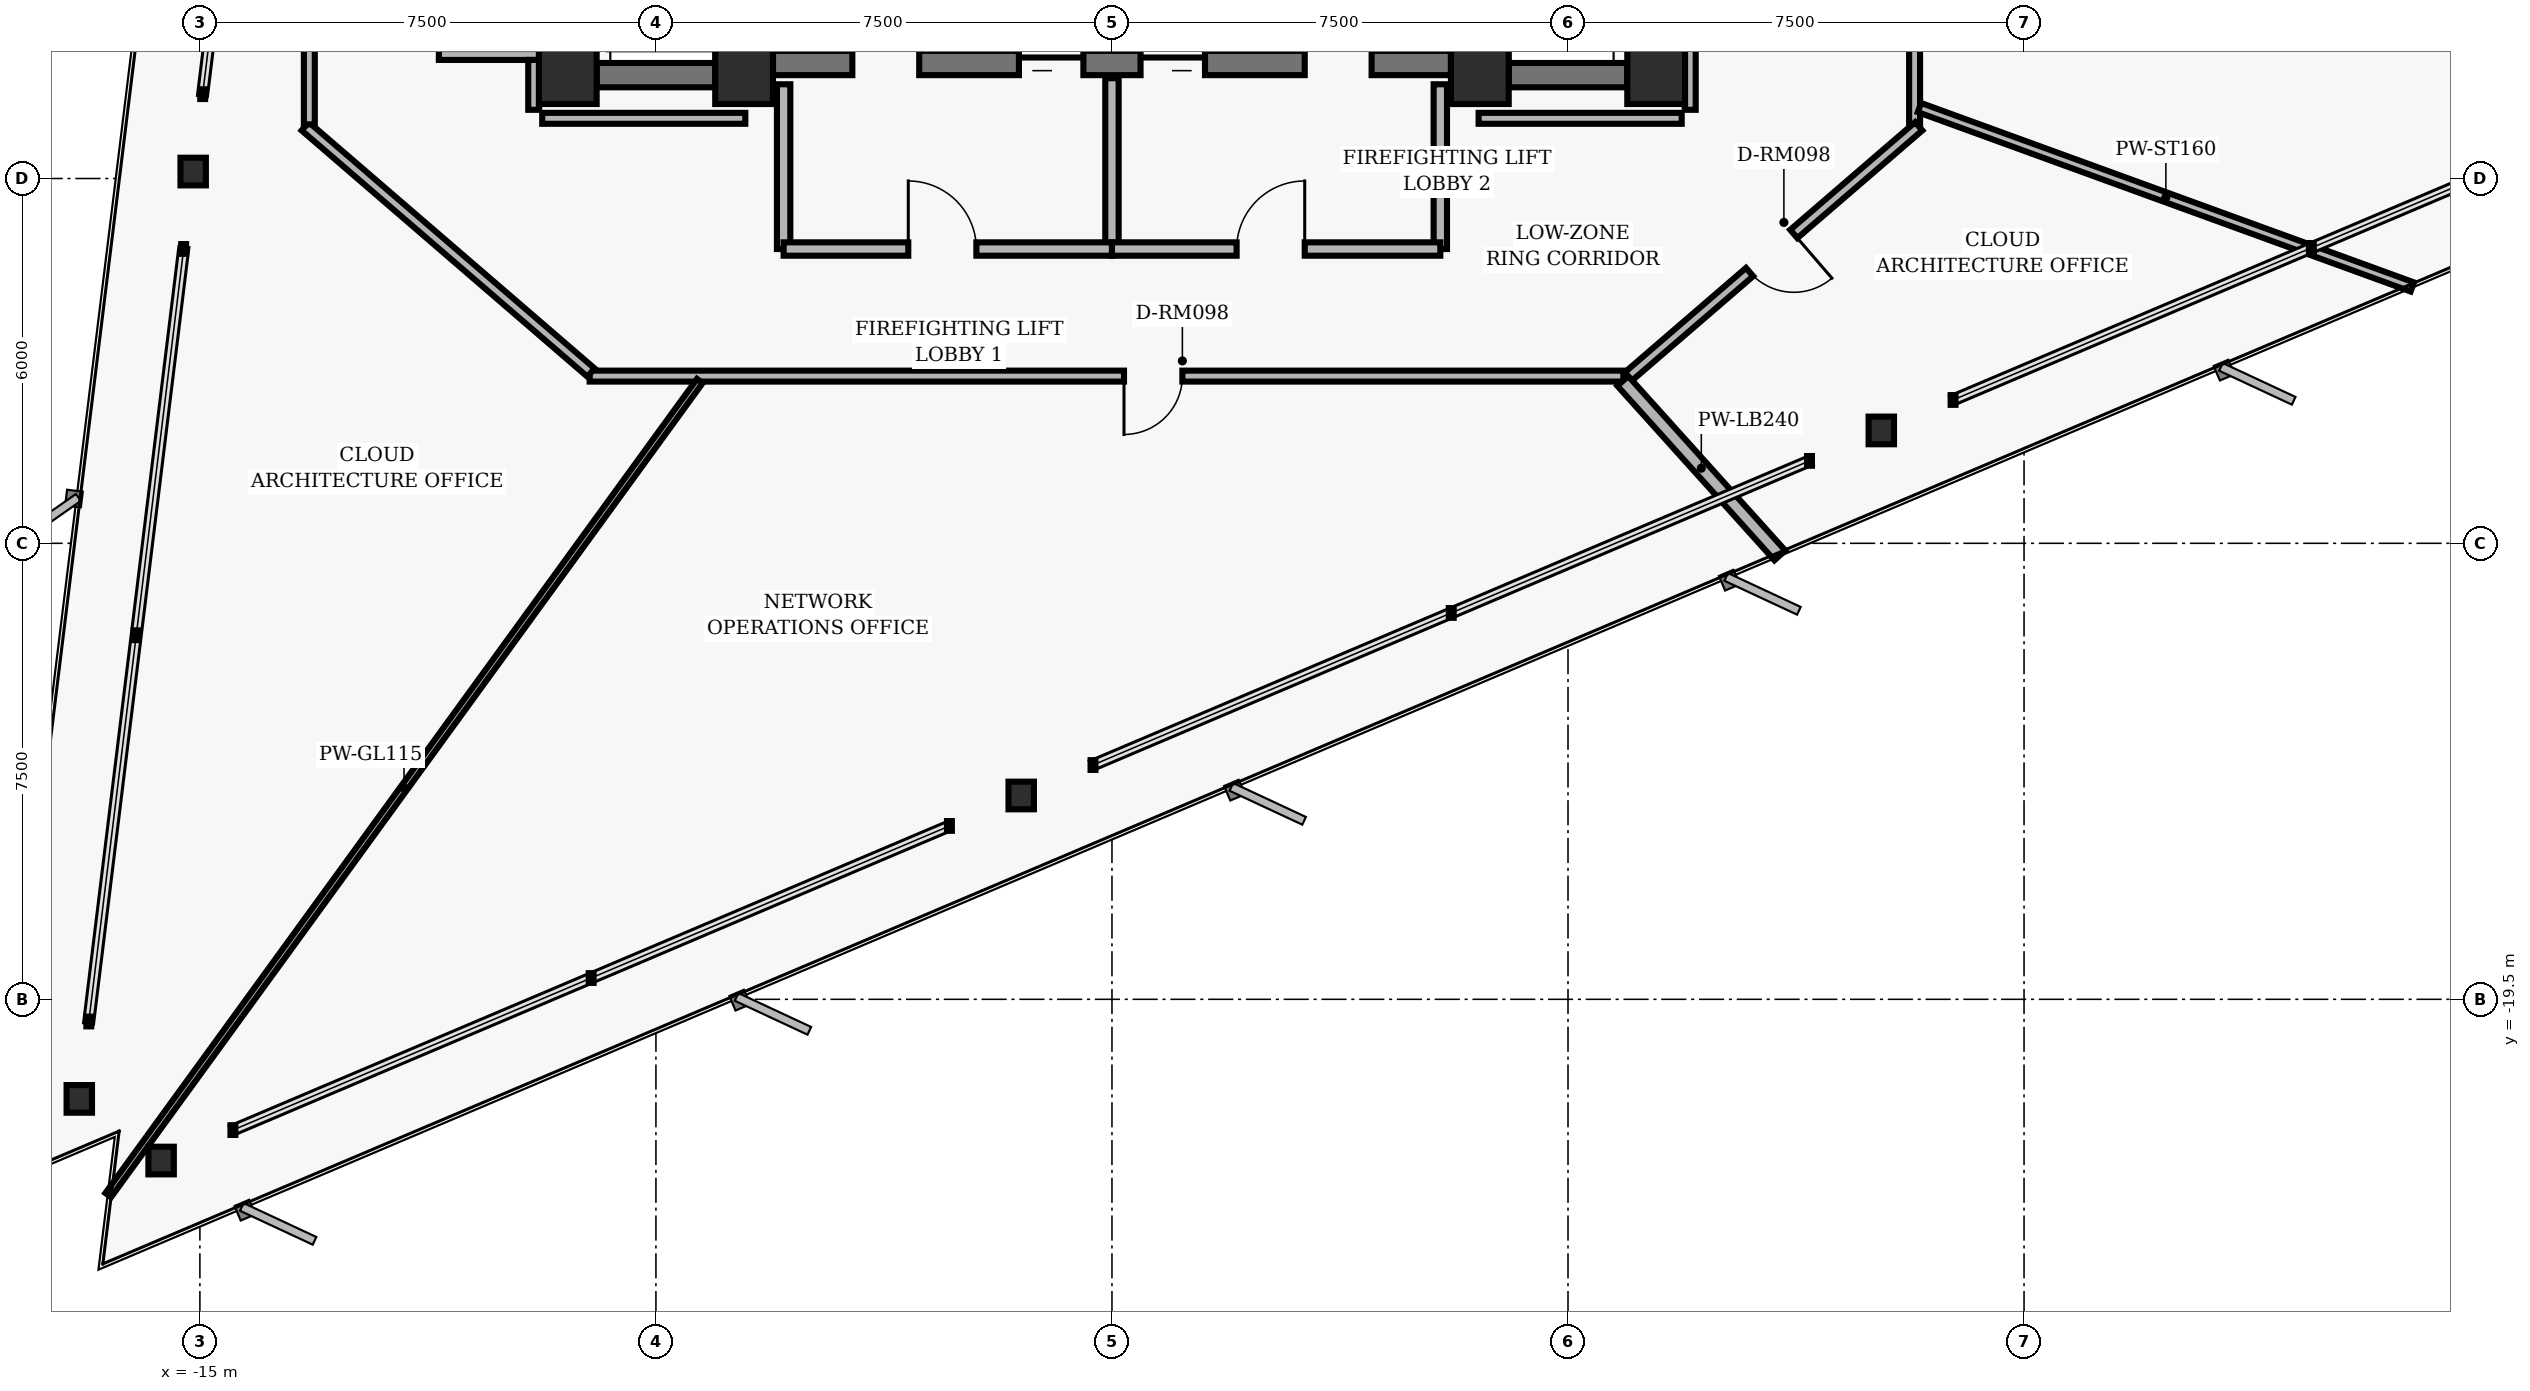
"""IFC4 building model, lengths in metres.
Left out: names, types, materials, properties, quantities, classifications, styles, units other than length and angle.
Written with IfcOpenShell. Run it as: python <this file> out.ifc"""

import sys

from ifc_helpers import new_model, si_unit, direction, frame, frame_2d, origin, origin_2d, place, context, subcontext, project, spatial, rectangle, hollow_rectangle, i_section, extrude, element, fill, save


model = new_model("IFC4")
c1 = context("Model", 3, precision=1e-05, world=origin(), true_north=direction((0.0, 1.0)))
c2 = subcontext(c1, "Body", "Model", "MODEL_VIEW")
j1 = project(units=[si_unit("LENGTHUNIT", "METRE"), si_unit("PLANEANGLEUNIT", "RADIAN")], contexts=[c1])
p1 = place(None, origin())
s1 = spatial("IfcSite", under=j1, at=p1, CompositionType="ELEMENT")
p2 = place(p1, origin())
s2 = spatial("IfcBuilding", under=s1, at=p2, CompositionType="ELEMENT")
p3 = place(p2, frame((0.0, 0.0, 73.12)))
s3 = spatial("IfcBuildingStorey", under=s2, at=p3, CompositionType="ELEMENT", Elevation=73.12)
for number, where, z_axis, x_axis in (
    (1, (-6.05, -4.3, 0.0), (0.0, 0.0, 1.0), (1.0, 0.0, 0.0)),
    (2, (6.05, -4.3, 0.0), (0.0, 0.0, 1.0), (1.0, 0.0, 0.0)),
    (3, (-8.95, -4.3, 0.0), (0.0, 0.0, 1.0), (1.0, 0.0, 0.0)),
    (4, (8.95, -4.3, 0.0), (0.0, 0.0, 1.0), (1.0, 0.0, 0.0)),
):
    element("IfcColumn", number, at=place(p3, frame(where, z_axis=z_axis, x_axis=x_axis)), inside=s3, PredefinedType="COLUMN", context=c2, shape_type="SweptSolid", body=[
        extrude(hollow_rectangle(XDim=0.95, YDim=0.95, WallThickness=0.06, InnerFilletRadius=0.02, OuterFilletRadius=0.04, at=origin_2d()), origin(), (0.0, 0.0, 1.0), 3.36),
    ])
for number, where, z_axis, x_axis in (
    (5, (-1.94, -4.1, 0.0), (0.0, 0.0, 1.0), (0.0, 1.0, 0.0)),
    (6, (1.94, -4.1, 0.0), (0.0, 0.0, 1.0), (0.0, 1.0, 0.0)),
):
    element("IfcWall", number, at=place(p3, frame(where, z_axis=z_axis, x_axis=x_axis)), inside=s3, PredefinedType="SHEAR", context=c2, shape_type="SweptSolid", body=[
        extrude(rectangle(XDim=8.2, YDim=0.35, at=frame_2d((4.1, 0.0))), origin(), (0.0, 0.0, 1.0), 2.938),
    ])
p4 = place(p3, frame((-5.575, -4.1, 0.0), z_axis=(0.0, 0.0, 1.0), x_axis=(1.0, 0.0, 0.0)))
e7 = element("IfcWall", 7, at=p4, inside=s3, PredefinedType="SHEAR", context=c2, shape_type="SweptSolid", body=[
    extrude(rectangle(XDim=11.15, YDim=0.4, at=frame_2d((5.575, 0.0))), origin(), (0.0, 0.0, 1.0), 2.938),
])
p5 = place(p4, frame((1.305, 0.0, 0.0)))
e8 = element("IfcOpeningElement", 8, at=p5, cuts=e7, PredefinedType="OPENING", context=c2, shape_type="SweptSolid", body=[
    extrude(rectangle(XDim=1.1, YDim=2.04, at=frame_2d((0.55, 1.02))), frame((0.0, 0.21, 0.0), z_axis=(0.0, -1.0, 0.0), x_axis=(1.0, 0.0, 0.0)), (0.0, 0.0, 1.0), 0.42),
])
p6 = place(p4, frame((8.745, 0.0, 0.0)))
e9 = element("IfcOpeningElement", 9, at=p6, cuts=e7, PredefinedType="OPENING", context=c2, shape_type="SweptSolid", body=[
    extrude(rectangle(XDim=1.1, YDim=2.04, at=frame_2d((0.55, 1.02))), frame((0.0, 0.21, 0.0), z_axis=(0.0, -1.0, 0.0), x_axis=(1.0, 0.0, 0.0)), (0.0, 0.0, 1.0), 0.42),
])
p7 = place(p4, frame((4.045, 0.0, 0.0)))
e10 = element("IfcOpeningElement", 10, at=p7, cuts=e7, PredefinedType="OPENING", context=c2, shape_type="SweptSolid", body=[
    extrude(rectangle(XDim=1.06, YDim=2.04, at=frame_2d((0.53, 1.02))), frame((0.0, 0.21, 0.0), z_axis=(0.0, -1.0, 0.0), x_axis=(1.0, 0.0, 0.0)), (0.0, 0.0, 1.0), 0.42),
])
p8 = place(p4, frame((6.045, 0.0, 0.0)))
e11 = element("IfcOpeningElement", 11, at=p8, cuts=e7, PredefinedType="OPENING", context=c2, shape_type="SweptSolid", body=[
    extrude(rectangle(XDim=1.06, YDim=2.04, at=frame_2d((0.53, 1.02))), frame((0.0, 0.21, 0.0), z_axis=(0.0, -1.0, 0.0), x_axis=(1.0, 0.0, 0.0)), (0.0, 0.0, 1.0), 0.42),
])
for number, where, z_axis, x_axis in (
    (12, (-8.475, -4.3, 0.0), (0.0, 0.0, 1.0), (1.0, 0.0, 0.0)),
    (13, (6.525, -4.3, 0.0), (0.0, 0.0, 1.0), (1.0, 0.0, 0.0)),
):
    element("IfcWall", number, at=place(p3, frame(where, z_axis=z_axis, x_axis=x_axis)), inside=s3, PredefinedType="SHEAR", context=c2, shape_type="SweptSolid", body=[
        extrude(rectangle(XDim=1.95, YDim=0.4, at=frame_2d((0.975, 0.0))), origin(), (0.0, 0.0, 1.0), 2.938),
    ])
for number, where, z_axis, x_axis in (
    (14, (-15.111, -5.886, 0.0), (0.0, 0.0, 1.0), (1.0, 0.0, 0.0)),
    (15, (-16.983, -21.138, 0.0), (0.0, 0.0, 1.0), (1.0, 0.0, 0.0)),
    (16, (-15.638, -22.152, 0.0), (0.0, 0.0, 1.0), (1.0, 0.0, 0.0)),
    (17, (-1.493, -16.148, 0.0), (0.0, 0.0, 1.0), (1.0, 0.0, 0.0)),
    (18, (12.653, -10.143, 0.0), (0.0, 0.0, 1.0), (1.0, 0.0, 0.0)),
):
    element("IfcColumn", number, at=place(p3, frame(where, z_axis=z_axis, x_axis=x_axis)), inside=s3, PredefinedType="COLUMN", context=c2, shape_type="SweptSolid", body=[
        extrude(i_section(OverallWidth=0.418, OverallDepth=0.455, WebThickness=0.042, FlangeThickness=0.068, FilletRadius=0.025, at=origin_2d()), origin(), (0.0, 0.0, 1.0), 3.36),
    ])
for number, where, z_axis, x_axis in (
    (19, (-5.4, -7.16, 0.0), (0.0, 0.0, 1.0), (0.0, 1.0, 0.0)),
    (20, (5.4, -7.16, 0.0), (0.0, 0.0, 1.0), (0.0, 1.0, 0.0)),
):
    element("IfcWall", number, at=place(p3, frame(where, z_axis=z_axis, x_axis=x_axis)), inside=s3, PredefinedType="PARTITIONING", context=c2, shape_type="SweptSolid", body=[
        extrude(rectangle(XDim=2.71, YDim=0.22, at=frame_2d((1.355, 0.0))), origin(), (0.0, 0.0, 1.0), 2.913),
    ])
p9 = place(p3, frame((0.0, -7.16, 0.0), z_axis=(0.0, 0.0, 1.0), x_axis=(0.0, 1.0, 0.0)))
e21 = element("IfcWall", 21, at=p9, inside=s3, PredefinedType="PARTITIONING", context=c2, shape_type="SweptSolid", body=[
    extrude(rectangle(XDim=2.81, YDim=0.22, at=frame_2d((1.405, 0.0))), origin(), (0.0, 0.0, 1.0), 2.913),
])
p10 = place(p3, frame((-5.4, -7.16, 0.0), z_axis=(0.0, 0.0, 1.0), x_axis=(1.0, 0.0, 0.0)))
e22 = element("IfcWall", 22, at=p10, inside=s3, PredefinedType="PARTITIONING", context=c2, shape_type="SweptSolid", body=[
    extrude(rectangle(XDim=5.4, YDim=0.22, at=frame_2d((2.7, 0.0))), origin(), (0.0, 0.0, 1.0), 2.427),
])
p11 = place(p10, frame((2.05, 0.0, 0.0)))
e23 = element("IfcOpeningElement", 23, at=p11, cuts=e22, PredefinedType="OPENING", context=c2, shape_type="SweptSolid", body=[
    extrude(rectangle(XDim=1.12, YDim=2.02, at=frame_2d((0.56, 1.01))), frame((0.0, 0.12, 0.0), z_axis=(0.0, -1.0, 0.0), x_axis=(1.0, 0.0, 0.0)), (0.0, 0.0, 1.0), 0.24),
])
p12 = place(p3, frame((0.0, -7.16, 0.0), z_axis=(0.0, 0.0, 1.0), x_axis=(1.0, 0.0, 0.0)))
e24 = element("IfcWall", 24, at=p12, inside=s3, PredefinedType="PARTITIONING", context=c2, shape_type="SweptSolid", body=[
    extrude(rectangle(XDim=5.4, YDim=0.22, at=frame_2d((2.7, 0.0))), origin(), (0.0, 0.0, 1.0), 2.427),
])
p13 = place(p12, frame((2.05, 0.0, 0.0)))
e25 = element("IfcOpeningElement", 25, at=p13, cuts=e24, PredefinedType="OPENING", context=c2, shape_type="SweptSolid", body=[
    extrude(rectangle(XDim=1.12, YDim=2.02, at=frame_2d((0.56, 1.01))), frame((0.0, 0.12, 0.0), z_axis=(0.0, -1.0, 0.0), x_axis=(1.0, 0.0, 0.0)), (0.0, 0.0, 1.0), 0.24),
])
p14 = place(p3, frame((13.2, 5.11, 0.0), z_axis=(0.0, 0.0, 1.0), x_axis=(0.0, -1.0, 0.0)))
e26 = element("IfcWall", 26, at=p14, inside=s3, PredefinedType="PARTITIONING", context=c2, shape_type="SweptSolid", body=[
    extrude(rectangle(XDim=10.22, YDim=0.18, at=frame_2d((5.11, 0.0))), origin(), (0.0, 0.0, 1.0), 2.913),
])
p15 = place(p14, frame((4.6, 0.0, 0.0)))
e27 = element("IfcOpeningElement", 27, at=p15, cuts=e26, PredefinedType="OPENING", context=c2, shape_type="SweptSolid", body=[
    extrude(rectangle(XDim=1.02, YDim=2.02, at=frame_2d((0.51, 1.01))), frame((0.0, 0.1, 0.0), z_axis=(0.0, -1.0, 0.0), x_axis=(1.0, 0.0, 0.0)), (0.0, 0.0, 1.0), 0.2),
])
p16 = place(p3, frame((13.268, -5.141, 0.0), z_axis=(0.0, 0.0, 1.0), x_axis=(-0.757534501725, -0.65279512766, 0.0)))
e28 = element("IfcWall", 28, at=p16, inside=s3, PredefinedType="PARTITIONING", context=c2, shape_type="SweptSolid", body=[
    extrude(rectangle(XDim=6.385, YDim=0.18, at=frame_2d((3.192, 0.0))), origin(), (0.0, 0.0, 1.0), 2.913),
])
p17 = place(p16, frame((2.712, 0.0, 0.0)))
e29 = element("IfcOpeningElement", 29, at=p17, cuts=e28, PredefinedType="OPENING", context=c2, shape_type="SweptSolid", body=[
    extrude(rectangle(XDim=0.96, YDim=2.02, at=frame_2d((0.48, 1.01))), frame((0.0, 0.1, 0.0), z_axis=(0.0, -1.0, 0.0), x_axis=(1.0, 0.0, 0.0)), (0.0, 0.0, 1.0), 0.2),
])
p18 = place(p3, frame((8.41, -9.25, 0.0), z_axis=(0.0, 0.0, 1.0), x_axis=(-1.0, 0.0, 0.0)))
e30 = element("IfcWall", 30, at=p18, inside=s3, PredefinedType="PARTITIONING", context=c2, shape_type="SweptSolid", body=[
    extrude(rectangle(XDim=17.0, YDim=0.18, at=frame_2d((8.5, 0.0))), origin(), (0.0, 0.0, 1.0), 2.427),
])
p19 = place(p18, frame((7.252, 0.0, 0.0)))
e31 = element("IfcOpeningElement", 31, at=p19, cuts=e30, PredefinedType="OPENING", context=c2, shape_type="SweptSolid", body=[
    extrude(rectangle(XDim=0.96, YDim=2.02, at=frame_2d((0.48, 1.01))), frame((0.0, 0.1, 0.0), z_axis=(0.0, -1.0, 0.0), x_axis=(1.0, 0.0, 0.0)), (0.0, 0.0, 1.0), 0.2),
])
p20 = place(p3, frame((-8.568, -9.191, 0.0), z_axis=(0.0, 0.0, 1.0), x_axis=(-0.757556899173, 0.652769135694, 0.0)))
e32 = element("IfcWall", 32, at=p20, inside=s3, PredefinedType="PARTITIONING", context=c2, shape_type="SweptSolid", body=[
    extrude(rectangle(XDim=6.204, YDim=0.18, at=frame_2d((3.102, 0.0))), origin(), (0.0, 0.0, 1.0), 2.913),
])
p21 = place(p3, frame((-13.2, -5.11, 0.0), z_axis=(0.0, 0.0, 1.0), x_axis=(0.0, 1.0, 0.0)))
e33 = element("IfcWall", 33, at=p21, inside=s3, PredefinedType="PARTITIONING", context=c2, shape_type="SweptSolid", body=[
    extrude(rectangle(XDim=10.22, YDim=0.18, at=frame_2d((5.11, 0.0))), origin(), (0.0, 0.0, 1.0), 2.427),
])
p22 = place(p21, frame((3.616, 0.0, 0.0)))
e34 = element("IfcOpeningElement", 34, at=p22, cuts=e33, PredefinedType="OPENING", context=c2, shape_type="SweptSolid", body=[
    extrude(rectangle(XDim=0.96, YDim=2.02, at=frame_2d((0.48, 1.01))), frame((0.0, 0.1, 0.0), z_axis=(0.0, -1.0, 0.0), x_axis=(1.0, 0.0, 0.0)), (0.0, 0.0, 1.0), 0.2),
])
p23 = place(p3, frame((-11.07, -3.96, 0.0), z_axis=(0.0, 0.0, 1.0), x_axis=(1.0, 0.0, 0.0)))
e35 = element("IfcWall", 35, at=p23, inside=s3, PredefinedType="PARTITIONING", context=c2, shape_type="SweptSolid", body=[
    extrude(rectangle(XDim=1.65, YDim=0.18, at=frame_2d((0.825, 0.0))), origin(), (0.0, 0.0, 1.0), 2.913),
])
p24 = place(p3, frame((-9.51, -4.05, 0.0), z_axis=(0.0, 0.0, 1.0), x_axis=(0.0, -1.0, 0.0)))
e36 = element("IfcWall", 36, at=p24, inside=s3, PredefinedType="PARTITIONING", context=c2, shape_type="SweptSolid", body=[
    extrude(rectangle(XDim=0.82, YDim=0.18, at=frame_2d((0.41, 0.0))), origin(), (0.0, 0.0, 1.0), 2.913),
])
for number, where, z_axis, x_axis in (
    (37, (-9.37, -5.01, 0.0), (0.0, 0.0, 1.0), (1.0, 0.0, 0.0)),
    (38, (6.03, -5.01, 0.0), (0.0, 0.0, 1.0), (1.0, 0.0, 0.0)),
):
    element("IfcWall", number, at=place(p3, frame(where, z_axis=z_axis, x_axis=x_axis)), inside=s3, PredefinedType="PARTITIONING", context=c2, shape_type="SweptSolid", body=[
        extrude(rectangle(XDim=3.34, YDim=0.18, at=frame_2d((1.67, 0.0))), origin(), (0.0, 0.0, 1.0), 2.913),
    ])
p25 = place(p3, frame((9.51, -4.87, 0.0), z_axis=(0.0, 0.0, 1.0), x_axis=(0.0, 1.0, 0.0)))
e39 = element("IfcWall", 39, at=p25, inside=s3, PredefinedType="PARTITIONING", context=c2, shape_type="SweptSolid", body=[
    extrude(rectangle(XDim=9.74, YDim=0.18, at=frame_2d((4.87, 0.0))), origin(), (0.0, 0.0, 1.0), 2.913),
])
p26 = place(p3, frame((-6.779, -9.33, 0.0), z_axis=(0.0, 0.0, 1.0), x_axis=(-0.587788360635, -0.809014736023, 0.0)))
e40 = element("IfcWall", 40, at=p26, inside=s3, PredefinedType="MOVABLE", context=c2, shape_type="SweptSolid", body=[
    extrude(rectangle(XDim=16.552, YDim=0.115, at=frame_2d((8.276, 0.0))), origin(), (0.0, 0.0, 1.0), 2.198),
])
p27 = place(p3, frame((8.401, -9.33, 0.0), z_axis=(0.0, 0.0, 1.0), x_axis=(0.669139425, -0.743136885043, 0.0)))
e41 = element("IfcWall", 41, at=p27, inside=s3, PredefinedType="PARTITIONING", context=c2, shape_type="SweptSolid", body=[
    extrude(rectangle(XDim=3.86, YDim=0.24, at=frame_2d((1.93, 0.0))), origin(), (0.0, 0.0, 1.0), 2.913),
])
p28 = place(p3, frame((13.28, -4.833, 0.0), z_axis=(0.0, 0.0, 1.0), x_axis=(0.939687597414, -0.342033944611, 0.0)))
e42 = element("IfcWall", 42, at=p28, inside=s3, PredefinedType="PARTITIONING", context=c2, shape_type="SweptSolid", body=[
    extrude(rectangle(XDim=8.625, YDim=0.16, at=frame_2d((4.313, 0.0))), origin(), (0.0, 0.0, 1.0), 2.913),
])
p29 = place(p5, origin())
e43 = element("IfcDoor", 43, at=p29, inside=s3, OperationType="SINGLE_SWING_LEFT", PredefinedType="DOOR", context=c2, shape_type="SweptSolid", body=[
    extrude(rectangle(XDim=1.1, YDim=2.04, at=frame_2d((0.55, 1.02))), frame((0.0, 0.025, 0.0), z_axis=(0.0, -1.0, 0.0), x_axis=(1.0, 0.0, 0.0)), (0.0, 0.0, 1.0), 0.05),
])
fill(e8, e43)
p30 = place(p6, origin())
e44 = element("IfcDoor", 44, at=p30, inside=s3, OperationType="SINGLE_SWING_RIGHT", PredefinedType="DOOR", context=c2, shape_type="SweptSolid", body=[
    extrude(rectangle(XDim=1.1, YDim=2.04, at=frame_2d((0.55, 1.02))), frame((0.0, 0.025, 0.0), z_axis=(0.0, -1.0, 0.0), x_axis=(1.0, 0.0, 0.0)), (0.0, 0.0, 1.0), 0.05),
])
fill(e9, e44)
p31 = place(p7, origin())
e45 = element("IfcDoor", 45, at=p31, inside=s3, OperationType="SLIDING_TO_LEFT", PredefinedType="DOOR", context=c2, shape_type="SweptSolid", body=[
    extrude(rectangle(XDim=1.06, YDim=2.04, at=frame_2d((0.53, 1.02))), frame((0.0, 0.025, 0.0), z_axis=(0.0, -1.0, 0.0), x_axis=(1.0, 0.0, 0.0)), (0.0, 0.0, 1.0), 0.05),
])
fill(e10, e45)
p32 = place(p8, origin())
e46 = element("IfcDoor", 46, at=p32, inside=s3, OperationType="SLIDING_TO_RIGHT", PredefinedType="DOOR", context=c2, shape_type="SweptSolid", body=[
    extrude(rectangle(XDim=1.06, YDim=2.04, at=frame_2d((0.53, 1.02))), frame((0.0, 0.025, 0.0), z_axis=(0.0, -1.0, 0.0), x_axis=(1.0, 0.0, 0.0)), (0.0, 0.0, 1.0), 0.05),
])
fill(e11, e46)
p33 = place(p11, origin())
e47 = element("IfcDoor", 47, at=p33, inside=s3, OperationType="SINGLE_SWING_LEFT", PredefinedType="DOOR", context=c2, shape_type="SweptSolid", body=[
    extrude(rectangle(XDim=1.12, YDim=2.02, at=frame_2d((0.56, 1.01))), frame((0.0, 0.025, 0.0), z_axis=(0.0, -1.0, 0.0), x_axis=(1.0, 0.0, 0.0)), (0.0, 0.0, 1.0), 0.05),
])
fill(e23, e47)
p34 = place(p13, origin())
e48 = element("IfcDoor", 48, at=p34, inside=s3, OperationType="SINGLE_SWING_RIGHT", PredefinedType="DOOR", context=c2, shape_type="SweptSolid", body=[
    extrude(rectangle(XDim=1.12, YDim=2.02, at=frame_2d((0.56, 1.01))), frame((0.0, 0.025, 0.0), z_axis=(0.0, -1.0, 0.0), x_axis=(1.0, 0.0, 0.0)), (0.0, 0.0, 1.0), 0.05),
])
fill(e25, e48)
p35 = place(p19, origin())
e49 = element("IfcDoor", 49, at=p35, inside=s3, OperationType="SINGLE_SWING_RIGHT", PredefinedType="DOOR", context=c2, shape_type="SweptSolid", body=[
    extrude(rectangle(XDim=0.96, YDim=2.02, at=frame_2d((0.48, 1.01))), frame((0.0, 0.025, 0.0), z_axis=(0.0, -1.0, 0.0), x_axis=(1.0, 0.0, 0.0)), (0.0, 0.0, 1.0), 0.05),
])
fill(e31, e49)
p36 = place(p17, origin())
e50 = element("IfcDoor", 50, at=p36, inside=s3, OperationType="SINGLE_SWING_LEFT", PredefinedType="DOOR", context=c2, shape_type="SweptSolid", body=[
    extrude(rectangle(XDim=0.96, YDim=2.02, at=frame_2d((0.48, 1.01))), frame((0.0, 0.025, 0.0), z_axis=(0.0, -1.0, 0.0), x_axis=(1.0, 0.0, 0.0)), (0.0, 0.0, 1.0), 0.05),
])
fill(e29, e50)
save(model, sys.argv[1])
